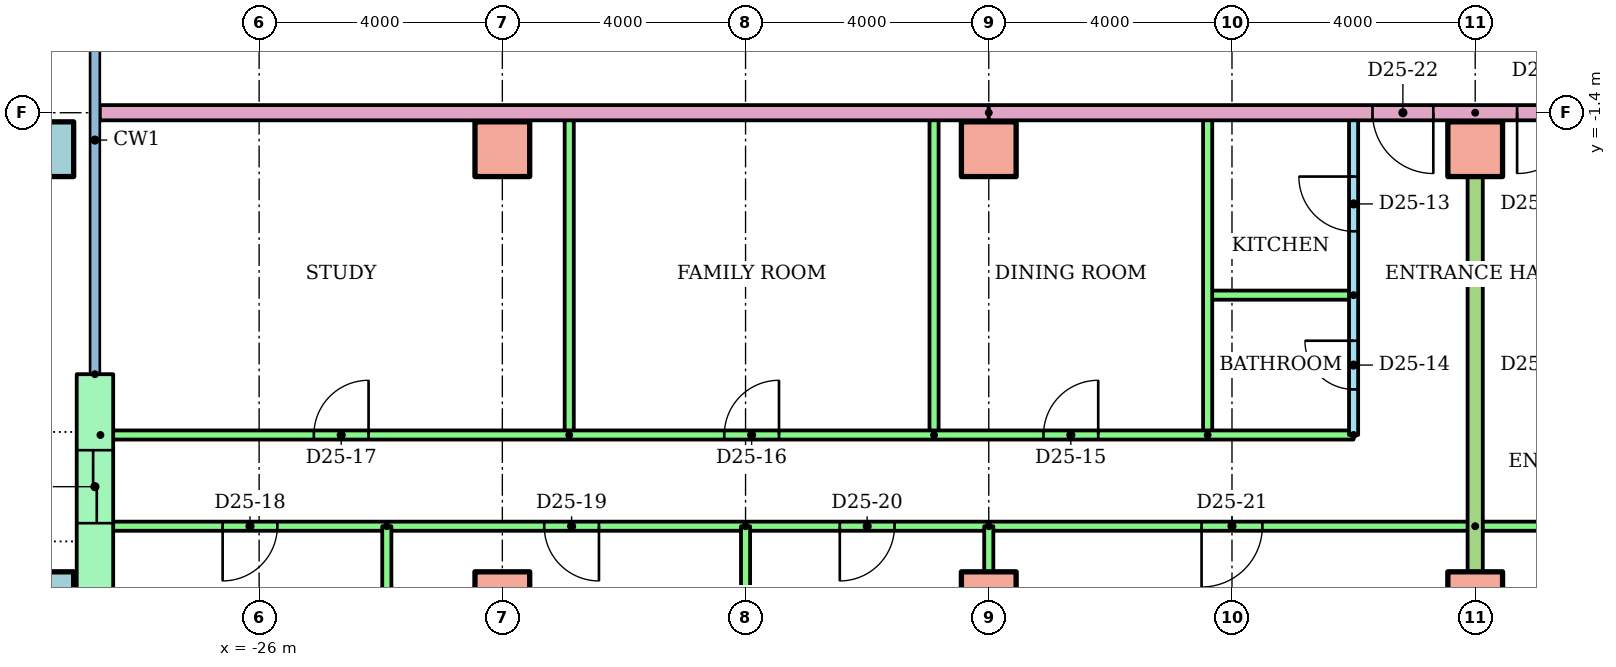
"""IFC4 building model, lengths in metres.
Left out: names, types, materials, properties, quantities, classifications, styles, units other than length and angle.
Written with IfcOpenShell. Run it as: python <this file> out.ifc"""

import sys

from ifc_helpers import new_model, si_unit, direction, frame, frame_2d, origin, origin_2d, place, context, subcontext, project, spatial, rectangle, hollow_rectangle, extrude, element, fill, save


model = new_model("IFC4")
c1 = context("Model", 3, precision=1e-05, world=origin(), true_north=direction((0.0, 1.0)))
c2 = subcontext(c1, "Body", "Model", "MODEL_VIEW")
j1 = project(units=[si_unit("LENGTHUNIT", "METRE"), si_unit("PLANEANGLEUNIT", "RADIAN")], contexts=[c1])
p1 = place(None, origin())
s1 = spatial("IfcSite", under=j1, at=p1, CompositionType="ELEMENT")
p2 = place(p1, origin())
s2 = spatial("IfcBuilding", under=s1, at=p2, CompositionType="ELEMENT")
p3 = place(p2, frame((0.0, 0.0, 96.7)))
s3 = spatial("IfcBuildingStorey", under=s2, at=p3, CompositionType="ELEMENT", Elevation=96.7)
p4 = place(p3, frame((-29.5, -9.4, 0.0)))
e1 = element("IfcColumn", 1, at=p4, inside=s3, PredefinedType="COLUMN", context=c2, shape_type="SweptSolid", body=[
    extrude(hollow_rectangle(XDim=0.9, YDim=0.9, WallThickness=0.045, at=origin_2d()), origin(), (0.0, 0.0, 1.0), 3.2),
])
for number, where in (
    (2, (-22.0, -9.4, 0.0)),
    (3, (-14.0, -9.4, 0.0)),
    (4, (-6.0, -9.4, 0.0)),
):
    element("IfcColumn", number, at=place(p3, frame(where)), inside=s3, PredefinedType="COLUMN", context=c2, shape_type="SweptSolid", body=[
        extrude(rectangle(XDim=0.9, YDim=0.9, at=origin_2d()), origin(), (0.0, 0.0, 1.0), 3.2),
    ])
p5 = place(p3, frame((-29.5, -2.0, 0.0)))
e5 = element("IfcColumn", 5, at=p5, inside=s3, PredefinedType="COLUMN", context=c2, shape_type="SweptSolid", body=[
    extrude(hollow_rectangle(XDim=0.9, YDim=0.9, WallThickness=0.045, at=origin_2d()), origin(), (0.0, 0.0, 1.0), 3.2),
])
for number, where in (
    (6, (-22.0, -2.0, 0.0)),
    (7, (-14.0, -2.0, 0.0)),
    (8, (-6.0, -2.0, 0.0)),
):
    element("IfcColumn", number, at=place(p3, frame(where)), inside=s3, PredefinedType="COLUMN", context=c2, shape_type="SweptSolid", body=[
        extrude(rectangle(XDim=0.9, YDim=0.9, at=origin_2d()), origin(), (0.0, 0.0, 1.0), 3.2),
    ])
p6 = place(p3, frame((-28.7, -5.7, 0.0), z_axis=(0.0, 0.0, 1.0), x_axis=(0.0, -1.0, 0.0)))
e9 = element("IfcWall", 9, at=p6, inside=s3, PredefinedType="STANDARD", context=c2, shape_type="SweptSolid", body=[
    extrude(rectangle(XDim=3.7, YDim=0.6, at=frame_2d((1.85, 0.0))), origin(), (0.0, 0.0, 1.0), 2.92),
])
p7 = place(p6, frame((1.25, 0.0, 0.0)))
e10 = element("IfcOpeningElement", 10, at=p7, cuts=e9, PredefinedType="OPENING", context=c2, shape_type="SweptSolid", body=[
    extrude(rectangle(XDim=1.2, YDim=2.1, at=frame_2d((0.6, 1.05))), frame((0.0, 0.31, 0.0), z_axis=(0.0, -1.0, 0.0), x_axis=(1.0, 0.0, 0.0)), (0.0, 0.0, 1.0), 0.62),
])
p8 = place(p3, frame((-8.0, -6.7, 0.0), z_axis=(0.0, 0.0, 1.0), x_axis=(0.0, 1.0, 0.0)))
e11 = element("IfcWall", 11, at=p8, inside=s3, PredefinedType="PARTITIONING", context=c2, shape_type="SweptSolid", body=[
    extrude(rectangle(XDim=5.3, YDim=0.15, at=frame_2d((2.65, 0.0))), origin(), (0.0, 0.0, 1.0), 2.4),
])
p9 = place(p8, frame((3.35, 0.0, 0.0)))
e12 = element("IfcOpeningElement", 12, at=p9, cuts=e11, PredefinedType="OPENING", context=c2, shape_type="SweptSolid", body=[
    extrude(rectangle(XDim=0.9, YDim=2.1, at=frame_2d((0.45, 1.05))), frame((0.0, 0.085, 0.0), z_axis=(0.0, -1.0, 0.0), x_axis=(1.0, 0.0, 0.0)), (0.0, 0.0, 1.0), 0.17),
])
p10 = place(p8, frame((0.75, 0.0, 0.0)))
e13 = element("IfcOpeningElement", 13, at=p10, cuts=e11, PredefinedType="OPENING", context=c2, shape_type="SweptSolid", body=[
    extrude(rectangle(XDim=0.8, YDim=2.1, at=frame_2d((0.4, 1.05))), frame((0.0, 0.085, 0.0), z_axis=(0.0, -1.0, 0.0), x_axis=(1.0, 0.0, 0.0)), (0.0, 0.0, 1.0), 0.17),
])
p11 = place(p3, frame((-8.0, -4.4, 0.0), z_axis=(0.0, 0.0, 1.0), x_axis=(-1.0, 0.0, 0.0)))
e14 = element("IfcWall", 14, at=p11, inside=s3, PredefinedType="PARTITIONING", context=c2, shape_type="SweptSolid", body=[
    extrude(rectangle(XDim=2.4, YDim=0.15, at=frame_2d((1.2, 0.0))), origin(), (0.0, 0.0, 1.0), 2.4),
])
for number, where, z_axis, x_axis in (
    (15, (-10.4, -6.7, 0.0), (0.0, 0.0, 1.0), (0.0, 1.0, 0.0)),
    (16, (-14.9, -6.7, 0.0), (0.0, 0.0, 1.0), (0.0, 1.0, 0.0)),
    (17, (-20.9, -6.7, 0.0), (0.0, 0.0, 1.0), (0.0, 1.0, 0.0)),
):
    element("IfcWall", number, at=place(p3, frame(where, z_axis=z_axis, x_axis=x_axis)), inside=s3, PredefinedType="PARTITIONING", context=c2, shape_type="SweptSolid", body=[
        extrude(rectangle(XDim=5.3, YDim=0.15, at=frame_2d((2.65, 0.0))), origin(), (0.0, 0.0, 1.0), 2.4),
    ])
p12 = place(p3, frame((-28.61, -6.7, 0.0)))
e18 = element("IfcWall", 18, at=p12, inside=s3, PredefinedType="PARTITIONING", context=c2, shape_type="SweptSolid", body=[
    extrude(rectangle(XDim=20.61, YDim=0.15, at=frame_2d((10.305, 0.0))), origin(), (0.0, 0.0, 1.0), 2.4),
])
p13 = place(p12, frame((15.51, 0.0, 0.0)))
e19 = element("IfcOpeningElement", 19, at=p13, cuts=e18, PredefinedType="OPENING", context=c2, shape_type="SweptSolid", body=[
    extrude(rectangle(XDim=0.9, YDim=2.1, at=frame_2d((0.45, 1.05))), frame((0.0, 0.085, 0.0), z_axis=(0.0, -1.0, 0.0), x_axis=(1.0, 0.0, 0.0)), (0.0, 0.0, 1.0), 0.17),
])
p14 = place(p12, frame((10.26, 0.0, 0.0)))
e20 = element("IfcOpeningElement", 20, at=p14, cuts=e18, PredefinedType="OPENING", context=c2, shape_type="SweptSolid", body=[
    extrude(rectangle(XDim=0.9, YDim=2.1, at=frame_2d((0.45, 1.05))), frame((0.0, 0.085, 0.0), z_axis=(0.0, -1.0, 0.0), x_axis=(1.0, 0.0, 0.0)), (0.0, 0.0, 1.0), 0.17),
])
p15 = place(p12, frame((3.51, 0.0, 0.0)))
e21 = element("IfcOpeningElement", 21, at=p15, cuts=e18, PredefinedType="OPENING", context=c2, shape_type="SweptSolid", body=[
    extrude(rectangle(XDim=0.9, YDim=2.1, at=frame_2d((0.45, 1.05))), frame((0.0, 0.085, 0.0), z_axis=(0.0, -1.0, 0.0), x_axis=(1.0, 0.0, 0.0)), (0.0, 0.0, 1.0), 0.17),
])
p16 = place(p3, frame((-6.0, -8.2, 0.0), z_axis=(0.0, 0.0, 1.0), x_axis=(-1.0, 0.0, 0.0)))
e22 = element("IfcWall", 22, at=p16, inside=s3, PredefinedType="PARTITIONING", context=c2, shape_type="SweptSolid", body=[
    extrude(rectangle(XDim=22.61, YDim=0.15, at=frame_2d((11.305, 0.0))), origin(), (0.0, 0.0, 1.0), 2.4),
])
p17 = place(p16, frame((19.7, 0.0, 0.0)))
e23 = element("IfcOpeningElement", 23, at=p17, cuts=e22, PredefinedType="OPENING", context=c2, shape_type="SweptSolid", body=[
    extrude(rectangle(XDim=0.9, YDim=2.1, at=frame_2d((0.45, 1.05))), frame((0.0, 0.085, 0.0), z_axis=(0.0, -1.0, 0.0), x_axis=(1.0, 0.0, 0.0)), (0.0, 0.0, 1.0), 0.17),
])
p18 = place(p16, frame((14.411, 0.0, 0.0)))
e24 = element("IfcOpeningElement", 24, at=p18, cuts=e22, PredefinedType="OPENING", context=c2, shape_type="SweptSolid", body=[
    extrude(rectangle(XDim=0.9, YDim=2.1, at=frame_2d((0.45, 1.05))), frame((0.0, 0.085, 0.0), z_axis=(0.0, -1.0, 0.0), x_axis=(1.0, 0.0, 0.0)), (0.0, 0.0, 1.0), 0.17),
])
p19 = place(p16, frame((9.55, 0.0, 0.0)))
e25 = element("IfcOpeningElement", 25, at=p19, cuts=e22, PredefinedType="OPENING", context=c2, shape_type="SweptSolid", body=[
    extrude(rectangle(XDim=0.9, YDim=2.1, at=frame_2d((0.45, 1.05))), frame((0.0, 0.085, 0.0), z_axis=(0.0, -1.0, 0.0), x_axis=(1.0, 0.0, 0.0)), (0.0, 0.0, 1.0), 0.17),
])
p20 = place(p16, frame((3.5, 0.0, 0.0)))
e26 = element("IfcOpeningElement", 26, at=p20, cuts=e22, PredefinedType="OPENING", context=c2, shape_type="SweptSolid", body=[
    extrude(rectangle(XDim=1.0, YDim=2.1, at=frame_2d((0.5, 1.05))), frame((0.0, 0.085, 0.0), z_axis=(0.0, -1.0, 0.0), x_axis=(1.0, 0.0, 0.0)), (0.0, 0.0, 1.0), 0.17),
])
p21 = place(p3, frame((-23.9, -8.2, 0.0), z_axis=(0.0, 0.0, 1.0), x_axis=(0.0, -1.0, 0.0)))
e27 = element("IfcWall", 27, at=p21, inside=s3, PredefinedType="PARTITIONING", context=c2, shape_type="SweptSolid", body=[
    extrude(rectangle(XDim=6.22, YDim=0.15, at=frame_2d((3.11, 0.0))), origin(), (0.0, 0.0, 1.0), 2.4),
])
p22 = place(p3, frame((-18.0, -8.2, 0.0), z_axis=(0.0, 0.0, 1.0), x_axis=(0.0, -1.0, 0.0)))
e28 = element("IfcWall", 28, at=p22, inside=s3, PredefinedType="PARTITIONING", context=c2, shape_type="SweptSolid", body=[
    extrude(rectangle(XDim=8.021, YDim=0.15, at=frame_2d((4.01, 0.0))), origin(), (0.0, 0.0, 1.0), 2.4),
])
p23 = place(p3, frame((-14.0, -8.2, 0.0), z_axis=(0.0, 0.0, 1.0), x_axis=(0.0, -1.0, 0.0)))
e29 = element("IfcWall", 29, at=p23, inside=s3, PredefinedType="PARTITIONING", context=c2, shape_type="SweptSolid", body=[
    extrude(rectangle(XDim=8.01, YDim=0.15, at=frame_2d((4.005, 0.0))), origin(), (0.0, 0.0, 1.0), 2.4),
])
p24 = place(p3, frame((18.0, -8.2, 0.0), z_axis=(0.0, 0.0, 1.0), x_axis=(-1.0, 0.0, 0.0)))
e30 = element("IfcWall", 30, at=p24, inside=s3, PredefinedType="PARTITIONING", context=c2, shape_type="SweptSolid", body=[
    extrude(rectangle(XDim=24.0, YDim=0.15, at=frame_2d((12.0, 0.0))), origin(), (0.0, 0.0, 1.0), 2.4),
])
p25 = place(p24, frame((19.5, 0.0, 0.0)))
e31 = element("IfcOpeningElement", 31, at=p25, cuts=e30, PredefinedType="OPENING", context=c2, shape_type="SweptSolid", body=[
    extrude(rectangle(XDim=1.0, YDim=2.1, at=frame_2d((0.5, 1.05))), frame((0.0, 0.085, 0.0), z_axis=(0.0, -1.0, 0.0), x_axis=(1.0, 0.0, 0.0)), (0.0, 0.0, 1.0), 0.17),
])
p26 = place(p24, frame((13.55, 0.0, 0.0)))
e32 = element("IfcOpeningElement", 32, at=p26, cuts=e30, PredefinedType="OPENING", context=c2, shape_type="SweptSolid", body=[
    extrude(rectangle(XDim=0.9, YDim=2.1, at=frame_2d((0.45, 1.05))), frame((0.0, 0.085, 0.0), z_axis=(0.0, -1.0, 0.0), x_axis=(1.0, 0.0, 0.0)), (0.0, 0.0, 1.0), 0.17),
])
p27 = place(p24, frame((9.55, 0.0, 0.0)))
e33 = element("IfcOpeningElement", 33, at=p27, cuts=e30, PredefinedType="OPENING", context=c2, shape_type="SweptSolid", body=[
    extrude(rectangle(XDim=0.9, YDim=2.1, at=frame_2d((0.45, 1.05))), frame((0.0, 0.085, 0.0), z_axis=(0.0, -1.0, 0.0), x_axis=(1.0, 0.0, 0.0)), (0.0, 0.0, 1.0), 0.17),
])
p28 = place(p24, frame((5.55, 0.0, 0.0)))
e34 = element("IfcOpeningElement", 34, at=p28, cuts=e30, PredefinedType="OPENING", context=c2, shape_type="SweptSolid", body=[
    extrude(rectangle(XDim=0.9, YDim=2.1, at=frame_2d((0.45, 1.05))), frame((0.0, 0.085, 0.0), z_axis=(0.0, -1.0, 0.0), x_axis=(1.0, 0.0, 0.0)), (0.0, 0.0, 1.0), 0.17),
])
p29 = place(p24, frame((1.55, 0.0, 0.0)))
e35 = element("IfcOpeningElement", 35, at=p29, cuts=e30, PredefinedType="OPENING", context=c2, shape_type="SweptSolid", body=[
    extrude(rectangle(XDim=0.9, YDim=2.1, at=frame_2d((0.45, 1.05))), frame((0.0, 0.085, 0.0), z_axis=(0.0, -1.0, 0.0), x_axis=(1.0, 0.0, 0.0)), (0.0, 0.0, 1.0), 0.17),
])
p30 = place(p3, frame((-6.0, -1.4, 0.0), z_axis=(0.0, 0.0, 1.0), x_axis=(0.0, -1.0, 0.0)))
e36 = element("IfcWall", 36, at=p30, inside=s3, PredefinedType="PARTITIONING", context=c2, shape_type="SweptSolid", body=[
    extrude(rectangle(XDim=14.81, YDim=0.25, at=frame_2d((7.405, 0.0))), origin(), (0.0, 0.0, 1.0), 2.4),
])
p31 = place(p3, frame((-14.0, -1.4, 0.0), z_axis=(0.0, 0.0, 1.0), x_axis=(-1.0, 0.0, 0.0)))
e37 = element("IfcWall", 37, at=p31, inside=s3, PredefinedType="PARTITIONING", context=c2, shape_type="SweptSolid", body=[
    extrude(rectangle(XDim=14.62, YDim=0.25, at=frame_2d((7.31, 0.0))), origin(), (0.0, 0.0, 1.0), 2.4),
])
p32 = place(p3, frame((14.0, -1.4, 0.0), z_axis=(0.0, 0.0, 1.0), x_axis=(-1.0, 0.0, 0.0)))
e38 = element("IfcWall", 38, at=p32, inside=s3, PredefinedType="PARTITIONING", context=c2, shape_type="SweptSolid", body=[
    extrude(rectangle(XDim=28.0, YDim=0.25, at=frame_2d((14.0, 0.0))), origin(), (0.0, 0.0, 1.0), 2.4),
])
p33 = place(p32, frame((20.689, 0.0, 0.0)))
e39 = element("IfcOpeningElement", 39, at=p33, cuts=e38, PredefinedType="OPENING", context=c2, shape_type="SweptSolid", body=[
    extrude(rectangle(XDim=1.0, YDim=2.1, at=frame_2d((0.5, 1.05))), frame((0.0, 0.135, 0.0), z_axis=(0.0, -1.0, 0.0), x_axis=(1.0, 0.0, 0.0)), (0.0, 0.0, 1.0), 0.27),
])
p34 = place(p32, frame((18.311, 0.0, 0.0)))
e40 = element("IfcOpeningElement", 40, at=p34, cuts=e38, PredefinedType="OPENING", context=c2, shape_type="SweptSolid", body=[
    extrude(rectangle(XDim=1.0, YDim=2.1, at=frame_2d((0.5, 1.05))), frame((0.0, 0.135, 0.0), z_axis=(0.0, -1.0, 0.0), x_axis=(1.0, 0.0, 0.0)), (0.0, 0.0, 1.0), 0.27),
])
p35 = place(p9, origin())
e41 = element("IfcDoor", 41, at=p35, inside=s3, OperationType="SINGLE_SWING_RIGHT", PredefinedType="DOOR", context=c2, shape_type="SweptSolid", body=[
    extrude(rectangle(XDim=0.9, YDim=2.1, at=frame_2d((0.45, 1.05))), frame((0.0, 0.025, 0.0), z_axis=(0.0, -1.0, 0.0), x_axis=(1.0, 0.0, 0.0)), (0.0, 0.0, 1.0), 0.05),
])
fill(e12, e41)
p36 = place(p10, origin())
e42 = element("IfcDoor", 42, at=p36, inside=s3, OperationType="SINGLE_SWING_RIGHT", PredefinedType="DOOR", context=c2, shape_type="SweptSolid", body=[
    extrude(rectangle(XDim=0.8, YDim=2.1, at=frame_2d((0.4, 1.05))), frame((0.0, 0.025, 0.0), z_axis=(0.0, -1.0, 0.0), x_axis=(1.0, 0.0, 0.0)), (0.0, 0.0, 1.0), 0.05),
])
fill(e13, e42)
p37 = place(p13, origin())
e43 = element("IfcDoor", 43, at=p37, inside=s3, OperationType="SINGLE_SWING_RIGHT", PredefinedType="DOOR", context=c2, shape_type="SweptSolid", body=[
    extrude(rectangle(XDim=0.9, YDim=2.1, at=frame_2d((0.45, 1.05))), frame((0.0, 0.025, 0.0), z_axis=(0.0, -1.0, 0.0), x_axis=(1.0, 0.0, 0.0)), (0.0, 0.0, 1.0), 0.05),
])
fill(e19, e43)
p38 = place(p14, origin())
e44 = element("IfcDoor", 44, at=p38, inside=s3, OperationType="SINGLE_SWING_RIGHT", PredefinedType="DOOR", context=c2, shape_type="SweptSolid", body=[
    extrude(rectangle(XDim=0.9, YDim=2.1, at=frame_2d((0.45, 1.05))), frame((0.0, 0.025, 0.0), z_axis=(0.0, -1.0, 0.0), x_axis=(1.0, 0.0, 0.0)), (0.0, 0.0, 1.0), 0.05),
])
fill(e20, e44)
p39 = place(p15, origin())
e45 = element("IfcDoor", 45, at=p39, inside=s3, OperationType="SINGLE_SWING_RIGHT", PredefinedType="DOOR", context=c2, shape_type="SweptSolid", body=[
    extrude(rectangle(XDim=0.9, YDim=2.1, at=frame_2d((0.45, 1.05))), frame((0.0, 0.025, 0.0), z_axis=(0.0, -1.0, 0.0), x_axis=(1.0, 0.0, 0.0)), (0.0, 0.0, 1.0), 0.05),
])
fill(e21, e45)
p40 = place(p17, origin())
e46 = element("IfcDoor", 46, at=p40, inside=s3, OperationType="SINGLE_SWING_RIGHT", PredefinedType="DOOR", context=c2, shape_type="SweptSolid", body=[
    extrude(rectangle(XDim=0.9, YDim=2.1, at=frame_2d((0.45, 1.05))), frame((0.0, 0.025, 0.0), z_axis=(0.0, -1.0, 0.0), x_axis=(1.0, 0.0, 0.0)), (0.0, 0.0, 1.0), 0.05),
])
fill(e23, e46)
p41 = place(p18, origin())
e47 = element("IfcDoor", 47, at=p41, inside=s3, OperationType="SINGLE_SWING_LEFT", PredefinedType="DOOR", context=c2, shape_type="SweptSolid", body=[
    extrude(rectangle(XDim=0.9, YDim=2.1, at=frame_2d((0.45, 1.05))), frame((0.0, 0.025, 0.0), z_axis=(0.0, -1.0, 0.0), x_axis=(1.0, 0.0, 0.0)), (0.0, 0.0, 1.0), 0.05),
])
fill(e24, e47)
p42 = place(p19, origin())
e48 = element("IfcDoor", 48, at=p42, inside=s3, OperationType="SINGLE_SWING_RIGHT", PredefinedType="DOOR", context=c2, shape_type="SweptSolid", body=[
    extrude(rectangle(XDim=0.9, YDim=2.1, at=frame_2d((0.45, 1.05))), frame((0.0, 0.025, 0.0), z_axis=(0.0, -1.0, 0.0), x_axis=(1.0, 0.0, 0.0)), (0.0, 0.0, 1.0), 0.05),
])
fill(e25, e48)
p43 = place(p20, origin())
e49 = element("IfcDoor", 49, at=p43, inside=s3, OperationType="SINGLE_SWING_RIGHT", PredefinedType="DOOR", context=c2, shape_type="SweptSolid", body=[
    extrude(rectangle(XDim=1.0, YDim=2.1, at=frame_2d((0.5, 1.05))), frame((0.0, 0.025, 0.0), z_axis=(0.0, -1.0, 0.0), x_axis=(1.0, 0.0, 0.0)), (0.0, 0.0, 1.0), 0.05),
])
fill(e26, e49)
p44 = place(p33, origin())
e50 = element("IfcDoor", 50, at=p44, inside=s3, OperationType="SINGLE_SWING_LEFT", PredefinedType="DOOR", context=c2, shape_type="SweptSolid", body=[
    extrude(rectangle(XDim=1.0, YDim=2.1, at=frame_2d((0.5, 1.05))), frame((0.0, 0.025, 0.0), z_axis=(0.0, -1.0, 0.0), x_axis=(1.0, 0.0, 0.0)), (0.0, 0.0, 1.0), 0.05),
])
fill(e39, e50)
p45 = place(p34, origin())
e51 = element("IfcDoor", 51, at=p45, inside=s3, OperationType="SINGLE_SWING_RIGHT", PredefinedType="DOOR", context=c2, shape_type="SweptSolid", body=[
    extrude(rectangle(XDim=1.0, YDim=2.1, at=frame_2d((0.5, 1.05))), frame((0.0, 0.025, 0.0), z_axis=(0.0, -1.0, 0.0), x_axis=(1.0, 0.0, 0.0)), (0.0, 0.0, 1.0), 0.05),
])
fill(e40, e51)
p46 = place(p7, origin())
e52 = element("IfcDoor", 52, at=p46, inside=s3, OperationType="SLIDING_TO_LEFT", PredefinedType="DOOR", context=c2, shape_type="SweptSolid", body=[
    extrude(rectangle(XDim=1.2, YDim=2.1, at=frame_2d((0.6, 1.05))), frame((0.0, 0.025, 0.0), z_axis=(0.0, -1.0, 0.0), x_axis=(1.0, 0.0, 0.0)), (0.0, 0.0, 1.0), 0.05),
])
fill(e10, e52)
save(model, sys.argv[1])
